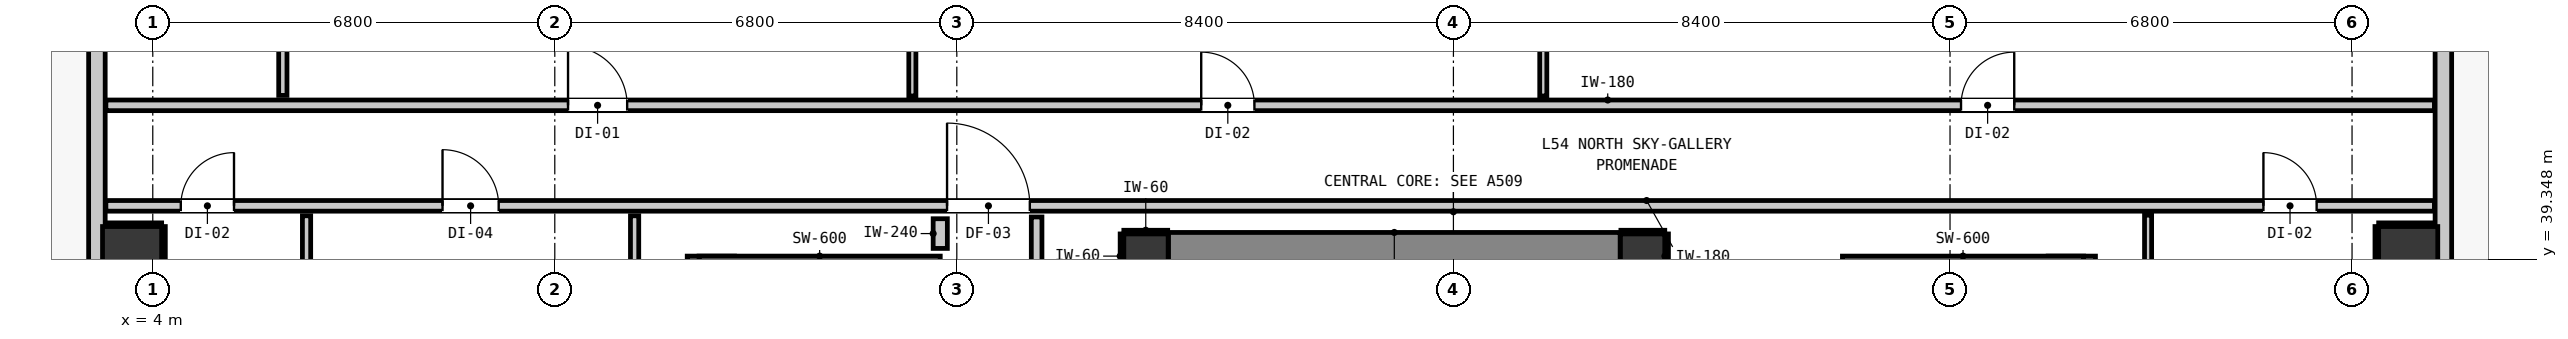
"""IFC4 building model, lengths in metres.
Left out: names, types, materials, properties, quantities, classifications, styles, units other than length and angle.
Written with IfcOpenShell. Run it as: python <this file> out.ifc"""

import sys

from ifc_helpers import new_model, si_unit, direction, frame, frame_2d, origin, origin_2d, place, context, subcontext, project, spatial, rectangle, extrude, element, fill, save


model = new_model("IFC4")
c1 = context("Model", 3, precision=1e-05, world=origin(), true_north=direction((0.0, 1.0)))
c2 = subcontext(c1, "Body", "Model", "MODEL_VIEW")
j1 = project(units=[si_unit("LENGTHUNIT", "METRE"), si_unit("PLANEANGLEUNIT", "RADIAN")], contexts=[c1])
p1 = place(None, origin())
s1 = spatial("IfcSite", under=j1, at=p1, CompositionType="ELEMENT")
p2 = place(p1, origin())
s2 = spatial("IfcBuilding", under=s1, at=p2, CompositionType="ELEMENT")
p3 = place(p2, frame((0.0, 0.0, 186.84)))
s3 = spatial("IfcBuildingStorey", under=s2, at=p3, CompositionType="ELEMENT", Elevation=186.84)
for number, where, z_axis, x_axis in (
    (1, (20.8, 39.4, 0.0), (0.0, 0.0, 1.0), (1.0, 0.0, 0.0)),
    (2, (29.2, 39.4, 0.0), (0.0, 0.0, 1.0), (1.0, 0.0, 0.0)),
):
    element("IfcColumn", number, at=place(p3, frame(where, z_axis=z_axis, x_axis=x_axis)), inside=s3, PredefinedType="COLUMN", context=c2, shape_type="SweptSolid", body=[
        extrude(rectangle(XDim=0.75, YDim=0.75, at=origin_2d()), origin(), (0.0, 0.0, 1.0), 3.32),
    ])
p4 = place(p3, frame((13.44, 31.08, 0.0), z_axis=(0.0, 0.0, 1.0), x_axis=(0.0, 1.0, 0.0)))
e3 = element("IfcWall", 3, at=p4, inside=s3, PredefinedType="SHEAR", context=c2, shape_type="SweptSolid", body=[
    extrude(rectangle(XDim=8.32, YDim=0.8, at=frame_2d((4.16, 0.0))), origin(), (0.0, 0.0, 1.0), 3.32),
])
p5 = place(p3, frame((13.24, 39.1, 0.0), z_axis=(0.0, 0.0, 1.0), x_axis=(1.0, 0.0, 0.0)))
e4 = element("IfcWall", 4, at=p5, inside=s3, PredefinedType="SHEAR", context=c2, shape_type="SweptSolid", body=[
    extrude(rectangle(XDim=4.08, YDim=0.6, at=frame_2d((2.04, 0.0))), origin(), (0.0, 0.0, 1.0), 3.32),
])
p6 = place(p3, frame((36.46, 31.08, 0.0), z_axis=(0.0, 0.0, 1.0), x_axis=(0.0, 1.0, 0.0)))
e5 = element("IfcWall", 5, at=p6, inside=s3, PredefinedType="SHEAR", context=c2, shape_type="SweptSolid", body=[
    extrude(rectangle(XDim=8.32, YDim=0.8, at=frame_2d((4.16, 0.0))), origin(), (0.0, 0.0, 1.0), 3.32),
])
p7 = place(p3, frame((32.58, 39.1, 0.0), z_axis=(0.0, 0.0, 1.0), x_axis=(1.0, 0.0, 0.0)))
e6 = element("IfcWall", 6, at=p7, inside=s3, PredefinedType="SHEAR", context=c2, shape_type="SweptSolid", body=[
    extrude(rectangle(XDim=4.08, YDim=0.6, at=frame_2d((2.04, 0.0))), origin(), (0.0, 0.0, 1.0), 3.32),
])
p8 = place(p3, frame((21.18, 39.4, 0.0), z_axis=(0.0, 0.0, 1.0), x_axis=(1.0, 0.0, 0.0)))
e7 = element("IfcWall", 7, at=p8, inside=s3, PredefinedType="SHEAR", context=c2, shape_type="SweptSolid", body=[
    extrude(rectangle(XDim=7.64, YDim=0.8, at=frame_2d((3.82, 0.0))), origin(), (0.0, 0.0, 1.0), 3.32),
])
for number, where, z_axis, x_axis in (
    (8, (3.65, 39.4, 0.0), (0.0, 0.0, 1.0), (1.0, 0.0, 0.0)),
    (9, (42.15, 39.4, 0.0), (0.0, 0.0, 1.0), (1.0, 0.0, 0.0)),
):
    element("IfcColumn", number, at=place(p3, frame(where, z_axis=z_axis, x_axis=x_axis)), inside=s3, PredefinedType="COLUMN", context=c2, shape_type="SweptSolid", body=[
        extrude(rectangle(XDim=1.0, YDim=1.0, at=origin_2d()), origin(), (0.0, 0.0, 1.0), 2.9),
    ])
p9 = place(p3, frame((3.055, 17.555, 0.0), z_axis=(0.0, 0.0, 1.0), x_axis=(0.0, 1.0, 0.0)))
e10 = element("IfcWall", 10, at=p9, inside=s3, PredefinedType="STANDARD", context=c2, shape_type="SweptSolid", body=[
    extrude(rectangle(XDim=32.29, YDim=0.28, at=frame_2d((16.145, 0.0))), origin(), (0.0, 0.0, 1.0), 2.9),
])
p10 = place(p9, frame((5.467, 0.0, 0.0)))
e11 = element("IfcOpeningElement", 11, at=p10, cuts=e10, PredefinedType="OPENING", context=c2, shape_type="SweptSolid", body=[
    extrude(rectangle(XDim=1.0, YDim=2.15, at=frame_2d((0.5, 1.075))), frame((0.0, 0.15, 0.0), z_axis=(0.0, -1.0, 0.0), x_axis=(1.0, 0.0, 0.0)), (0.0, 0.0, 1.0), 0.3),
])
p11 = place(p9, frame((8.831, 0.0, 0.85)))
e12 = element("IfcOpeningElement", 12, at=p11, cuts=e10, PredefinedType="OPENING", context=c2, shape_type="SweptSolid", body=[
    extrude(rectangle(XDim=1.65, YDim=1.75, at=frame_2d((0.825, 0.875))), frame((0.0, 0.15, 0.0), z_axis=(0.0, -1.0, 0.0), x_axis=(1.0, 0.0, 0.0)), (0.0, 0.0, 1.0), 0.3),
])
p12 = place(p3, frame((42.745, 49.845, 0.0), z_axis=(0.0, 0.0, 1.0), x_axis=(0.0, -1.0, 0.0)))
e13 = element("IfcWall", 13, at=p12, inside=s3, PredefinedType="STANDARD", context=c2, shape_type="SweptSolid", body=[
    extrude(rectangle(XDim=32.29, YDim=0.28, at=frame_2d((16.145, 0.0))), origin(), (0.0, 0.0, 1.0), 2.9),
])
p13 = place(p12, frame((0.904, 0.0, 0.0)))
e14 = element("IfcOpeningElement", 14, at=p13, cuts=e13, PredefinedType="OPENING", context=c2, shape_type="SweptSolid", body=[
    extrude(rectangle(XDim=1.0, YDim=2.15, at=frame_2d((0.5, 1.075))), frame((0.0, 0.15, 0.0), z_axis=(0.0, -1.0, 0.0), x_axis=(1.0, 0.0, 0.0)), (0.0, 0.0, 1.0), 0.3),
])
p14 = place(p12, frame((30.822, 0.0, 0.85)))
e15 = element("IfcOpeningElement", 15, at=p14, cuts=e13, PredefinedType="OPENING", context=c2, shape_type="SweptSolid", body=[
    extrude(rectangle(XDim=1.05, YDim=1.65, at=frame_2d((0.525, 0.825))), frame((0.0, 0.15, 0.0), z_axis=(0.0, -1.0, 0.0), x_axis=(1.0, 0.0, 0.0)), (0.0, 0.0, 1.0), 0.3),
])
p15 = place(p12, frame((4.124, 0.0, 0.85)))
e16 = element("IfcOpeningElement", 16, at=p15, cuts=e13, PredefinedType="OPENING", context=c2, shape_type="SweptSolid", body=[
    extrude(rectangle(XDim=1.65, YDim=1.75, at=frame_2d((0.825, 0.875))), frame((0.0, 0.15, 0.0), z_axis=(0.0, -1.0, 0.0), x_axis=(1.0, 0.0, 0.0)), (0.0, 0.0, 1.0), 0.3),
])
p16 = place(p12, frame((24.424, 0.0, 0.85)))
e17 = element("IfcOpeningElement", 17, at=p16, cuts=e13, PredefinedType="OPENING", context=c2, shape_type="SweptSolid", body=[
    extrude(rectangle(XDim=1.65, YDim=1.75, at=frame_2d((0.825, 0.875))), frame((0.0, 0.15, 0.0), z_axis=(0.0, -1.0, 0.0), x_axis=(1.0, 0.0, 0.0)), (0.0, 0.0, 1.0), 0.3),
])
p17 = place(p3, frame((3.207, 40.25, 0.0), z_axis=(0.0, 0.0, 1.0), x_axis=(1.0, 0.0, 0.0)))
e18 = element("IfcWall", 18, at=p17, inside=s3, PredefinedType="PARTITIONING", context=c2, shape_type="SweptSolid", body=[
    extrude(rectangle(XDim=39.386, YDim=0.18, at=frame_2d((19.693, 0.0))), origin(), (0.0, 0.0, 1.0), 2.9),
])
p18 = place(p17, frame((14.228, 0.0, 0.0)))
e19 = element("IfcOpeningElement", 19, at=p18, cuts=e18, PredefinedType="OPENING", context=c2, shape_type="SweptSolid", body=[
    extrude(rectangle(XDim=1.4, YDim=2.15, at=frame_2d((0.7, 1.075))), frame((0.0, 0.1, 0.0), z_axis=(0.0, -1.0, 0.0), x_axis=(1.0, 0.0, 0.0)), (0.0, 0.0, 1.0), 0.2),
])
p19 = place(p17, frame((1.267, 0.0, 0.0)))
e20 = element("IfcOpeningElement", 20, at=p19, cuts=e18, PredefinedType="OPENING", context=c2, shape_type="SweptSolid", body=[
    extrude(rectangle(XDim=0.9, YDim=2.1, at=frame_2d((0.45, 1.05))), frame((0.0, 0.1, 0.0), z_axis=(0.0, -1.0, 0.0), x_axis=(1.0, 0.0, 0.0)), (0.0, 0.0, 1.0), 0.2),
])
p20 = place(p17, frame((5.694, 0.0, 0.0)))
e21 = element("IfcOpeningElement", 21, at=p20, cuts=e18, PredefinedType="OPENING", context=c2, shape_type="SweptSolid", body=[
    extrude(rectangle(XDim=0.95, YDim=2.1, at=frame_2d((0.475, 1.05))), frame((0.0, 0.1, 0.0), z_axis=(0.0, -1.0, 0.0), x_axis=(1.0, 0.0, 0.0)), (0.0, 0.0, 1.0), 0.2),
])
p21 = place(p17, frame((36.494, 0.0, 0.0)))
e22 = element("IfcOpeningElement", 22, at=p21, cuts=e18, PredefinedType="OPENING", context=c2, shape_type="SweptSolid", body=[
    extrude(rectangle(XDim=0.9, YDim=2.1, at=frame_2d((0.45, 1.05))), frame((0.0, 0.1, 0.0), z_axis=(0.0, -1.0, 0.0), x_axis=(1.0, 0.0, 0.0)), (0.0, 0.0, 1.0), 0.2),
])
p22 = place(p3, frame((3.207, 41.95, 0.0), z_axis=(0.0, 0.0, 1.0), x_axis=(1.0, 0.0, 0.0)))
e23 = element("IfcWall", 23, at=p22, inside=s3, PredefinedType="PARTITIONING", context=c2, shape_type="SweptSolid", body=[
    extrude(rectangle(XDim=39.386, YDim=0.18, at=frame_2d((19.693, 0.0))), origin(), (0.0, 0.0, 1.0), 2.9),
])
p23 = place(p22, frame((7.817, 0.0, 0.0)))
e24 = element("IfcOpeningElement", 24, at=p23, cuts=e23, PredefinedType="OPENING", context=c2, shape_type="SweptSolid", body=[
    extrude(rectangle(XDim=1.0, YDim=2.15, at=frame_2d((0.5, 1.075))), frame((0.0, 0.1, 0.0), z_axis=(0.0, -1.0, 0.0), x_axis=(1.0, 0.0, 0.0)), (0.0, 0.0, 1.0), 0.2),
])
p24 = place(p22, frame((18.527, 0.0, 0.0)))
e25 = element("IfcOpeningElement", 25, at=p24, cuts=e23, PredefinedType="OPENING", context=c2, shape_type="SweptSolid", body=[
    extrude(rectangle(XDim=0.9, YDim=2.1, at=frame_2d((0.45, 1.05))), frame((0.0, 0.1, 0.0), z_axis=(0.0, -1.0, 0.0), x_axis=(1.0, 0.0, 0.0)), (0.0, 0.0, 1.0), 0.2),
])
p25 = place(p22, frame((31.379, 0.0, 0.0)))
e26 = element("IfcOpeningElement", 26, at=p25, cuts=e23, PredefinedType="OPENING", context=c2, shape_type="SweptSolid", body=[
    extrude(rectangle(XDim=0.9, YDim=2.1, at=frame_2d((0.45, 1.05))), frame((0.0, 0.1, 0.0), z_axis=(0.0, -1.0, 0.0), x_axis=(1.0, 0.0, 0.0)), (0.0, 0.0, 1.0), 0.2),
])
p26 = place(p3, frame((17.32, 39.53, 0.0), z_axis=(0.0, 0.0, 1.0), x_axis=(0.0, 1.0, 0.0)))
e27 = element("IfcWall", 27, at=p26, inside=s3, PredefinedType="PARTITIONING", context=c2, shape_type="SweptSolid", body=[
    extrude(rectangle(XDim=0.502, YDim=0.24, at=frame_2d((0.251, 0.0))), origin(), (0.0, 0.0, 1.0), 2.9),
])
p27 = place(p3, frame((18.95, 39.058, 0.0), z_axis=(0.0, 0.0, 1.0), x_axis=(0.0, 1.0, 0.0)))
e28 = element("IfcWall", 28, at=p27, inside=s3, PredefinedType="PARTITIONING", context=c2, shape_type="SweptSolid", body=[
    extrude(rectangle(XDim=1.004, YDim=0.18, at=frame_2d((0.502, 0.0))), origin(), (0.0, 0.0, 1.0), 2.9),
])
p28 = place(p3, frame((6.2, 42.118, 0.0), z_axis=(0.0, 0.0, 1.0), x_axis=(0.0, 1.0, 0.0)))
e29 = element("IfcWall", 29, at=p28, inside=s3, PredefinedType="PARTITIONING", context=c2, shape_type="SweptSolid", body=[
    extrude(rectangle(XDim=4.534, YDim=0.14, at=frame_2d((2.267, 0.0))), origin(), (0.0, 0.0, 1.0), 2.9),
])
p29 = place(p28, frame((1.807, 0.0, 0.0)))
e30 = element("IfcOpeningElement", 30, at=p29, cuts=e29, PredefinedType="OPENING", context=c2, shape_type="SweptSolid", body=[
    extrude(rectangle(XDim=0.9, YDim=2.1, at=frame_2d((0.45, 1.05))), frame((0.0, 0.08, 0.0), z_axis=(0.0, -1.0, 0.0), x_axis=(1.0, 0.0, 0.0)), (0.0, 0.0, 1.0), 0.16),
])
for number, where, z_axis, x_axis in (
    (31, (6.601, 34.648, 0.0), (0.0, 0.0, 1.0), (0.0, 1.0, 0.0)),
    (32, (12.15, 34.648, 0.0), (0.0, 0.0, 1.0), (0.0, 1.0, 0.0)),
):
    element("IfcWall", number, at=place(p3, frame(where, z_axis=z_axis, x_axis=x_axis)), inside=s3, PredefinedType="PARTITIONING", context=c2, shape_type="SweptSolid", body=[
        extrude(rectangle(XDim=5.434, YDim=0.14, at=frame_2d((2.717, 0.0))), origin(), (0.0, 0.0, 1.0), 2.9),
    ])
p30 = place(p3, frame((16.848, 42.108, 0.0), z_axis=(0.0, 0.0, 1.0), x_axis=(0.0, 1.0, 0.0)))
e33 = element("IfcWall", 33, at=p30, inside=s3, PredefinedType="PARTITIONING", context=c2, shape_type="SweptSolid", body=[
    extrude(rectangle(XDim=4.554, YDim=0.12, at=frame_2d((2.277, 0.0))), origin(), (0.0, 0.0, 1.0), 2.9),
])
p31 = place(p3, frame((27.52, 42.108, 0.0), z_axis=(0.0, 0.0, 1.0), x_axis=(0.0, 1.0, 0.0)))
e34 = element("IfcWall", 34, at=p31, inside=s3, PredefinedType="PARTITIONING", context=c2, shape_type="SweptSolid", body=[
    extrude(rectangle(XDim=9.885, YDim=0.12, at=frame_2d((4.942, 0.0))), origin(), (0.0, 0.0, 1.0), 2.9),
])
p32 = place(p3, frame((37.75, 32.138, 0.0), z_axis=(0.0, 0.0, 1.0), x_axis=(0.0, 1.0, 0.0)))
e35 = element("IfcWall", 35, at=p32, inside=s3, PredefinedType="PARTITIONING", context=c2, shape_type="SweptSolid", body=[
    extrude(rectangle(XDim=7.954, YDim=0.12, at=frame_2d((3.977, 0.0))), origin(), (0.0, 0.0, 1.0), 2.9),
])
p33 = place(p3, frame((20.425, 39.807, 0.0), z_axis=(0.0, 0.0, 1.0), x_axis=(1.0, 0.0, 0.0)))
e36 = element("IfcWall", 36, at=p33, inside=s3, PredefinedType="PARTITIONING", context=c2, shape_type="SweptSolid", body=[
    extrude(rectangle(XDim=0.742, YDim=0.06, at=frame_2d((0.371, 0.0))), origin(), (0.0, 0.0, 1.0), 0.905),
])
p34 = place(p3, frame((20.393, 39.025, 0.0), z_axis=(0.0, 0.0, 1.0), x_axis=(0.0, 1.0, 0.0)))
e37 = element("IfcWall", 37, at=p34, inside=s3, PredefinedType="PARTITIONING", context=c2, shape_type="SweptSolid", body=[
    extrude(rectangle(XDim=0.75, YDim=0.06, at=frame_2d((0.375, 0.0))), origin(), (0.0, 0.0, 1.0), 0.905),
])
p35 = place(p3, frame((28.833, 39.807, 0.0), z_axis=(0.0, 0.0, 1.0), x_axis=(1.0, 0.0, 0.0)))
e38 = element("IfcWall", 38, at=p35, inside=s3, PredefinedType="PARTITIONING", context=c2, shape_type="SweptSolid", body=[
    extrude(rectangle(XDim=0.742, YDim=0.06, at=frame_2d((0.371, 0.0))), origin(), (0.0, 0.0, 1.0), 0.905),
])
p36 = place(p3, frame((29.607, 39.025, 0.0), z_axis=(0.0, 0.0, 1.0), x_axis=(0.0, 1.0, 0.0)))
e39 = element("IfcWall", 39, at=p36, inside=s3, PredefinedType="PARTITIONING", context=c2, shape_type="SweptSolid", body=[
    extrude(rectangle(XDim=0.75, YDim=0.06, at=frame_2d((0.375, 0.0))), origin(), (0.0, 0.0, 1.0), 0.905),
])
p37 = place(p3, frame((3.21, 39.932, 0.0), z_axis=(0.0, 0.0, 1.0), x_axis=(1.0, 0.0, 0.0)))
e40 = element("IfcWall", 40, at=p37, inside=s3, PredefinedType="PARTITIONING", context=c2, shape_type="SweptSolid", body=[
    extrude(rectangle(XDim=0.94, YDim=0.06, at=frame_2d((0.47, 0.0))), origin(), (0.0, 0.0, 1.0), 0.905),
])
p38 = place(p3, frame((4.182, 38.9, 0.0), z_axis=(0.0, 0.0, 1.0), x_axis=(0.0, 1.0, 0.0)))
e41 = element("IfcWall", 41, at=p38, inside=s3, PredefinedType="PARTITIONING", context=c2, shape_type="SweptSolid", body=[
    extrude(rectangle(XDim=1.0, YDim=0.06, at=frame_2d((0.5, 0.0))), origin(), (0.0, 0.0, 1.0), 1.45),
])
p39 = place(p3, frame((41.65, 39.932, 0.0), z_axis=(0.0, 0.0, 1.0), x_axis=(1.0, 0.0, 0.0)))
e42 = element("IfcWall", 42, at=p39, inside=s3, PredefinedType="PARTITIONING", context=c2, shape_type="SweptSolid", body=[
    extrude(rectangle(XDim=0.94, YDim=0.06, at=frame_2d((0.47, 0.0))), origin(), (0.0, 0.0, 1.0), 0.905),
])
p40 = place(p3, frame((41.618, 38.9, 0.0), z_axis=(0.0, 0.0, 1.0), x_axis=(0.0, 1.0, 0.0)))
e43 = element("IfcWall", 43, at=p40, inside=s3, PredefinedType="PARTITIONING", context=c2, shape_type="SweptSolid", body=[
    extrude(rectangle(XDim=1.0, YDim=0.06, at=frame_2d((0.5, 0.0))), origin(), (0.0, 0.0, 1.0), 1.45),
])
p41 = place(p18, origin())
e44 = element("IfcDoor", 44, at=p41, inside=s3, OperationType="SINGLE_SWING_LEFT", PredefinedType="DOOR", context=c2, shape_type="SweptSolid", body=[
    extrude(rectangle(XDim=1.4, YDim=2.15, at=frame_2d((0.7, 1.075))), frame((0.0, 0.025, 0.0), z_axis=(0.0, -1.0, 0.0), x_axis=(1.0, 0.0, 0.0)), (0.0, 0.0, 1.0), 0.05),
])
fill(e19, e44)
p42 = place(p23, origin())
e45 = element("IfcDoor", 45, at=p42, inside=s3, OperationType="SINGLE_SWING_LEFT", PredefinedType="DOOR", context=c2, shape_type="SweptSolid", body=[
    extrude(rectangle(XDim=1.0, YDim=2.15, at=frame_2d((0.5, 1.075))), frame((0.0, 0.025, 0.0), z_axis=(0.0, -1.0, 0.0), x_axis=(1.0, 0.0, 0.0)), (0.0, 0.0, 1.0), 0.05),
])
fill(e24, e45)
p43 = place(p24, origin())
e46 = element("IfcDoor", 46, at=p43, inside=s3, OperationType="SINGLE_SWING_LEFT", PredefinedType="DOOR", context=c2, shape_type="SweptSolid", body=[
    extrude(rectangle(XDim=0.9, YDim=2.1, at=frame_2d((0.45, 1.05))), frame((0.0, 0.025, 0.0), z_axis=(0.0, -1.0, 0.0), x_axis=(1.0, 0.0, 0.0)), (0.0, 0.0, 1.0), 0.05),
])
fill(e25, e46)
p44 = place(p25, origin())
e47 = element("IfcDoor", 47, at=p44, inside=s3, OperationType="SINGLE_SWING_RIGHT", PredefinedType="DOOR", context=c2, shape_type="SweptSolid", body=[
    extrude(rectangle(XDim=0.9, YDim=2.1, at=frame_2d((0.45, 1.05))), frame((0.0, 0.025, 0.0), z_axis=(0.0, -1.0, 0.0), x_axis=(1.0, 0.0, 0.0)), (0.0, 0.0, 1.0), 0.05),
])
fill(e26, e47)
p45 = place(p19, origin())
e48 = element("IfcDoor", 48, at=p45, inside=s3, OperationType="SINGLE_SWING_RIGHT", PredefinedType="DOOR", context=c2, shape_type="SweptSolid", body=[
    extrude(rectangle(XDim=0.9, YDim=2.1, at=frame_2d((0.45, 1.05))), frame((0.0, 0.025, 0.0), z_axis=(0.0, -1.0, 0.0), x_axis=(1.0, 0.0, 0.0)), (0.0, 0.0, 1.0), 0.05),
])
fill(e20, e48)
p46 = place(p20, origin())
e49 = element("IfcDoor", 49, at=p46, inside=s3, OperationType="SINGLE_SWING_LEFT", PredefinedType="DOOR", context=c2, shape_type="SweptSolid", body=[
    extrude(rectangle(XDim=0.95, YDim=2.1, at=frame_2d((0.475, 1.05))), frame((0.0, 0.025, 0.0), z_axis=(0.0, -1.0, 0.0), x_axis=(1.0, 0.0, 0.0)), (0.0, 0.0, 1.0), 0.05),
])
fill(e21, e49)
p47 = place(p21, origin())
e50 = element("IfcDoor", 50, at=p47, inside=s3, OperationType="SINGLE_SWING_LEFT", PredefinedType="DOOR", context=c2, shape_type="SweptSolid", body=[
    extrude(rectangle(XDim=0.9, YDim=2.1, at=frame_2d((0.45, 1.05))), frame((0.0, 0.025, 0.0), z_axis=(0.0, -1.0, 0.0), x_axis=(1.0, 0.0, 0.0)), (0.0, 0.0, 1.0), 0.05),
])
fill(e22, e50)
save(model, sys.argv[1])
